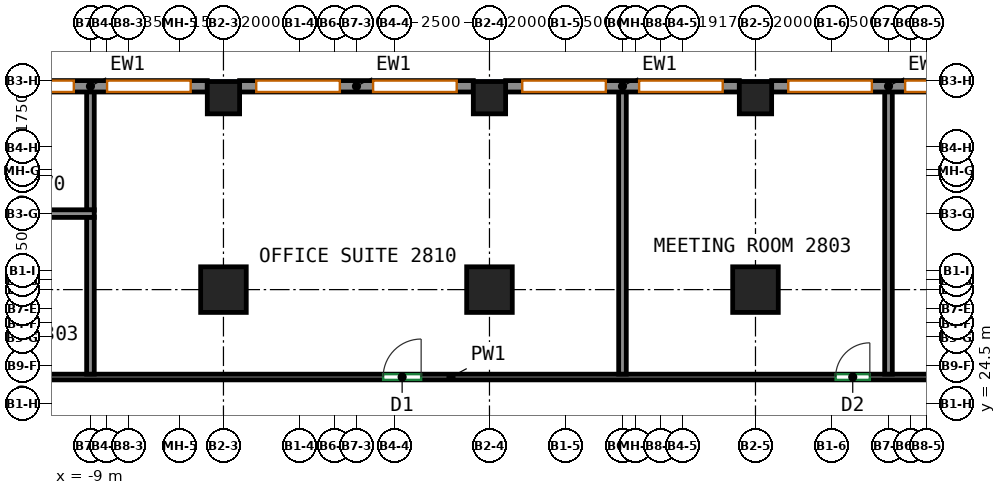
"""IFC4 building model, lengths in metres.
Left out: names, types, materials, properties, quantities, classifications, styles, units other than length and angle.
Written with IfcOpenShell. Run it as: python <this file> out.ifc"""

import sys

from ifc_helpers import new_model, si_unit, direction, frame, frame_2d, origin, origin_2d, place, context, subcontext, project, spatial, rectangle, extrude, source, transform, mapped, element, fill, save


model = new_model("IFC4")
c1 = context("Model", 3, precision=1e-05, world=origin(), true_north=direction((0.0, 1.0)))
c2 = subcontext(c1, "Body", "Model", "MODEL_VIEW")
j1 = project(units=[si_unit("LENGTHUNIT", "METRE"), si_unit("PLANEANGLEUNIT", "RADIAN")], contexts=[c1])
p1 = place(None, origin())
s1 = spatial("IfcSite", under=j1, at=p1, CompositionType="ELEMENT")
p2 = place(p1, origin())
s2 = spatial("IfcBuilding", under=s1, at=p2, CompositionType="ELEMENT")
p3 = place(p2, frame((0.0, 0.0, 120.6)))
s3 = spatial("IfcBuildingStorey", under=s2, at=p3, CompositionType="ELEMENT", Elevation=120.6)
m1 = source(origin(), c2, "Body", "SweptSolid", [
    extrude(rectangle(XDim=1.2, YDim=1.2, at=origin_2d()), origin(), (0.0, 0.0, 1.0), 3.72),
])
p4 = place(p3, frame((-5.5, 27.5, 0.0), z_axis=(0.0, 0.0, 1.0), x_axis=(1.0, 0.0, 0.0)))
e1 = element("IfcColumn", 1, at=p4, inside=s3, PredefinedType="COLUMN", context=c2, shape_type="MappedRepresentation", body=[
    mapped(m1, transform((0.0, 0.0, 0.0))),
])
m2 = source(origin(), c2, "Body", "SweptSolid", [
    extrude(rectangle(XDim=0.85, YDim=0.85, at=origin_2d()), origin(), (0.0, 0.0, 1.0), 3.72),
])
p5 = place(p3, frame((-5.5, 32.55, 0.0), z_axis=(0.0, 0.0, 1.0), x_axis=(1.0, 0.0, 0.0)))
e2 = element("IfcColumn", 2, at=p5, inside=s3, PredefinedType="COLUMN", context=c2, shape_type="MappedRepresentation", body=[
    mapped(m2, transform((0.0, 0.0, 0.0))),
])
p6 = place(p3, frame((1.5, 27.5, 0.0), z_axis=(0.0, 0.0, 1.0), x_axis=(1.0, 0.0, 0.0)))
e3 = element("IfcColumn", 3, at=p6, inside=s3, PredefinedType="COLUMN", context=c2, shape_type="MappedRepresentation", body=[
    mapped(m1, transform((0.0, 0.0, 0.0))),
])
p7 = place(p3, frame((1.5, 32.55, 0.0), z_axis=(0.0, 0.0, 1.0), x_axis=(1.0, 0.0, 0.0)))
e4 = element("IfcColumn", 4, at=p7, inside=s3, PredefinedType="COLUMN", context=c2, shape_type="MappedRepresentation", body=[
    mapped(m2, transform((0.0, 0.0, 0.0))),
])
p8 = place(p3, frame((8.5, 27.5, 0.0), z_axis=(0.0, 0.0, 1.0), x_axis=(1.0, 0.0, 0.0)))
e5 = element("IfcColumn", 5, at=p8, inside=s3, PredefinedType="COLUMN", context=c2, shape_type="MappedRepresentation", body=[
    mapped(m1, transform((0.0, 0.0, 0.0))),
])
p9 = place(p3, frame((8.5, 32.55, 0.0), z_axis=(0.0, 0.0, 1.0), x_axis=(1.0, 0.0, 0.0)))
e6 = element("IfcColumn", 6, at=p9, inside=s3, PredefinedType="COLUMN", context=c2, shape_type="MappedRepresentation", body=[
    mapped(m2, transform((0.0, 0.0, 0.0))),
])
m3 = source(origin(), c2, "Body", "SweptSolid", [
    extrude(rectangle(XDim=6.15, YDim=0.3, at=frame_2d((3.075, 0.0))), origin(), (0.0, 0.0, 1.0), 3.72),
])
p10 = place(p3, frame((15.075, 32.85, 0.0), z_axis=(0.0, 0.0, 1.0), x_axis=(-1.0, 0.0, 0.0)))
e7 = element("IfcWall", 7, at=p10, inside=s3, PredefinedType="SOLIDWALL", context=c2, shape_type="MappedRepresentation", body=[
    mapped(m3, transform((0.0, 0.0, 0.0))),
])
p11 = place(p10, frame((0.438, 0.0, 0.7)))
e8 = element("IfcOpeningElement", 8, at=p11, cuts=e7, PredefinedType="OPENING", context=c2, shape_type="SweptSolid", body=[
    extrude(rectangle(XDim=2.2, YDim=2.25, at=frame_2d((1.1, 1.125))), frame((0.0, 0.16, 0.0), z_axis=(0.0, -1.0, 0.0), x_axis=(1.0, 0.0, 0.0)), (0.0, 0.0, 1.0), 0.32),
])
p12 = place(p10, frame((3.512, 0.0, 0.7)))
e9 = element("IfcOpeningElement", 9, at=p12, cuts=e7, PredefinedType="OPENING", context=c2, shape_type="SweptSolid", body=[
    extrude(rectangle(XDim=2.2, YDim=2.25, at=frame_2d((1.1, 1.125))), frame((0.0, 0.16, 0.0), z_axis=(0.0, -1.0, 0.0), x_axis=(1.0, 0.0, 0.0)), (0.0, 0.0, 1.0), 0.32),
])
p13 = place(p3, frame((8.075, 32.85, 0.0), z_axis=(0.0, 0.0, 1.0), x_axis=(-1.0, 0.0, 0.0)))
e10 = element("IfcWall", 10, at=p13, inside=s3, PredefinedType="SOLIDWALL", context=c2, shape_type="MappedRepresentation", body=[
    mapped(m3, transform((0.0, 0.0, 0.0))),
])
p14 = place(p13, frame((0.438, 0.0, 0.7)))
e11 = element("IfcOpeningElement", 11, at=p14, cuts=e10, PredefinedType="OPENING", context=c2, shape_type="SweptSolid", body=[
    extrude(rectangle(XDim=2.2, YDim=2.25, at=frame_2d((1.1, 1.125))), frame((0.0, 0.16, 0.0), z_axis=(0.0, -1.0, 0.0), x_axis=(1.0, 0.0, 0.0)), (0.0, 0.0, 1.0), 0.32),
])
p15 = place(p13, frame((3.512, 0.0, 0.7)))
e12 = element("IfcOpeningElement", 12, at=p15, cuts=e10, PredefinedType="OPENING", context=c2, shape_type="SweptSolid", body=[
    extrude(rectangle(XDim=2.2, YDim=2.25, at=frame_2d((1.1, 1.125))), frame((0.0, 0.16, 0.0), z_axis=(0.0, -1.0, 0.0), x_axis=(1.0, 0.0, 0.0)), (0.0, 0.0, 1.0), 0.32),
])
p16 = place(p3, frame((1.075, 32.85, 0.0), z_axis=(0.0, 0.0, 1.0), x_axis=(-1.0, 0.0, 0.0)))
e13 = element("IfcWall", 13, at=p16, inside=s3, PredefinedType="SOLIDWALL", context=c2, shape_type="MappedRepresentation", body=[
    mapped(m3, transform((0.0, 0.0, 0.0))),
])
p17 = place(p16, frame((0.438, 0.0, 0.7)))
e14 = element("IfcOpeningElement", 14, at=p17, cuts=e13, PredefinedType="OPENING", context=c2, shape_type="SweptSolid", body=[
    extrude(rectangle(XDim=2.2, YDim=2.25, at=frame_2d((1.1, 1.125))), frame((0.0, 0.16, 0.0), z_axis=(0.0, -1.0, 0.0), x_axis=(1.0, 0.0, 0.0)), (0.0, 0.0, 1.0), 0.32),
])
p18 = place(p16, frame((3.512, 0.0, 0.7)))
e15 = element("IfcOpeningElement", 15, at=p18, cuts=e13, PredefinedType="OPENING", context=c2, shape_type="SweptSolid", body=[
    extrude(rectangle(XDim=2.2, YDim=2.25, at=frame_2d((1.1, 1.125))), frame((0.0, 0.16, 0.0), z_axis=(0.0, -1.0, 0.0), x_axis=(1.0, 0.0, 0.0)), (0.0, 0.0, 1.0), 0.32),
])
p19 = place(p3, frame((-5.925, 32.85, 0.0), z_axis=(0.0, 0.0, 1.0), x_axis=(-1.0, 0.0, 0.0)))
e16 = element("IfcWall", 16, at=p19, inside=s3, PredefinedType="SOLIDWALL", context=c2, shape_type="MappedRepresentation", body=[
    mapped(m3, transform((0.0, 0.0, 0.0))),
])
p20 = place(p19, frame((0.438, 0.0, 0.7)))
e17 = element("IfcOpeningElement", 17, at=p20, cuts=e16, PredefinedType="OPENING", context=c2, shape_type="SweptSolid", body=[
    extrude(rectangle(XDim=2.2, YDim=2.25, at=frame_2d((1.1, 1.125))), frame((0.0, 0.16, 0.0), z_axis=(0.0, -1.0, 0.0), x_axis=(1.0, 0.0, 0.0)), (0.0, 0.0, 1.0), 0.32),
])
p21 = place(p19, frame((3.512, 0.0, 0.7)))
e18 = element("IfcOpeningElement", 18, at=p21, cuts=e16, PredefinedType="OPENING", context=c2, shape_type="SweptSolid", body=[
    extrude(rectangle(XDim=2.2, YDim=2.25, at=frame_2d((1.1, 1.125))), frame((0.0, 0.16, 0.0), z_axis=(0.0, -1.0, 0.0), x_axis=(1.0, 0.0, 0.0)), (0.0, 0.0, 1.0), 0.32),
])
p22 = place(p3, frame((-19.6, 25.2, 0.0), z_axis=(0.0, 0.0, 1.0), x_axis=(1.0, 0.0, 0.0)))
e19 = element("IfcWall", 19, at=p22, inside=s3, PredefinedType="PARTITIONING", context=c2, shape_type="SweptSolid", body=[
    extrude(rectangle(XDim=40.175, YDim=0.15, at=frame_2d((20.087, 0.0))), origin(), (0.0, 0.0, 1.0), 3.72),
])
p23 = place(p22, frame((1.104, 0.0, 0.0)))
e20 = element("IfcOpeningElement", 20, at=p23, cuts=e19, PredefinedType="OPENING", context=c2, shape_type="SweptSolid", body=[
    extrude(rectangle(XDim=0.9, YDim=2.1, at=frame_2d((0.45, 1.05))), frame((0.0, 0.085, 0.0), z_axis=(0.0, -1.0, 0.0), x_axis=(1.0, 0.0, 0.0)), (0.0, 0.0, 1.0), 0.17),
])
p24 = place(p22, frame((5.296, 0.0, 0.0)))
e21 = element("IfcOpeningElement", 21, at=p24, cuts=e19, PredefinedType="OPENING", context=c2, shape_type="SweptSolid", body=[
    extrude(rectangle(XDim=0.9, YDim=2.1, at=frame_2d((0.45, 1.05))), frame((0.0, 0.085, 0.0), z_axis=(0.0, -1.0, 0.0), x_axis=(1.0, 0.0, 0.0)), (0.0, 0.0, 1.0), 0.17),
])
p25 = place(p22, frame((18.302, 0.0, 0.0)))
e22 = element("IfcOpeningElement", 22, at=p25, cuts=e19, PredefinedType="OPENING", context=c2, shape_type="SweptSolid", body=[
    extrude(rectangle(XDim=1.0, YDim=2.1, at=frame_2d((0.5, 1.05))), frame((0.0, 0.085, 0.0), z_axis=(0.0, -1.0, 0.0), x_axis=(1.0, 0.0, 0.0)), (0.0, 0.0, 1.0), 0.17),
])
p26 = place(p22, frame((30.209, 0.0, 0.0)))
e23 = element("IfcOpeningElement", 23, at=p26, cuts=e19, PredefinedType="OPENING", context=c2, shape_type="SweptSolid", body=[
    extrude(rectangle(XDim=0.9, YDim=2.1, at=frame_2d((0.45, 1.05))), frame((0.0, 0.085, 0.0), z_axis=(0.0, -1.0, 0.0), x_axis=(1.0, 0.0, 0.0)), (0.0, 0.0, 1.0), 0.17),
])
p27 = place(p22, frame((32.702, 0.0, 0.0)))
e24 = element("IfcOpeningElement", 24, at=p27, cuts=e19, PredefinedType="OPENING", context=c2, shape_type="SweptSolid", body=[
    extrude(rectangle(XDim=1.8, YDim=2.1, at=frame_2d((0.9, 1.05))), frame((0.0, 0.085, 0.0), z_axis=(0.0, -1.0, 0.0), x_axis=(1.0, 0.0, 0.0)), (0.0, 0.0, 1.0), 0.17),
])
for number, where, z_axis, x_axis in (
    (25, (12.0, 25.276, 0.0), (0.0, 0.0, 1.0), (0.0, 1.0, 0.0)),
    (26, (5.0, 25.276, 0.0), (0.0, 0.0, 1.0), (0.0, 1.0, 0.0)),
):
    element("IfcWall", number, at=place(p3, frame(where, z_axis=z_axis, x_axis=x_axis)), inside=s3, PredefinedType="PARTITIONING", context=c2, shape_type="SweptSolid", body=[
        extrude(rectangle(XDim=7.474, YDim=0.2, at=frame_2d((3.737, 0.0))), origin(), (0.0, 0.0, 1.0), 3.72),
    ])
p28 = place(p3, frame((-9.0, 25.276, 0.0), z_axis=(0.0, 0.0, 1.0), x_axis=(0.0, 1.0, 0.0)))
e27 = element("IfcWall", 27, at=p28, inside=s3, PredefinedType="PARTITIONING", context=c2, shape_type="SweptSolid", body=[
    extrude(rectangle(XDim=4.134, YDim=0.2, at=frame_2d((2.067, 0.0))), origin(), (0.0, 0.0, 1.0), 3.72),
])
p29 = place(p3, frame((-9.0, 29.59, 0.0), z_axis=(0.0, 0.0, 1.0), x_axis=(0.0, 1.0, 0.0)))
e28 = element("IfcWall", 28, at=p29, inside=s3, PredefinedType="PARTITIONING", context=c2, shape_type="SweptSolid", body=[
    extrude(rectangle(XDim=3.16, YDim=0.2, at=frame_2d((1.58, 0.0))), origin(), (0.0, 0.0, 1.0), 3.72),
])
p30 = place(p3, frame((-19.6, 29.5, 0.0), z_axis=(0.0, 0.0, 1.0), x_axis=(1.0, 0.0, 0.0)))
e29 = element("IfcWall", 29, at=p30, inside=s3, PredefinedType="PARTITIONING", context=c2, shape_type="SweptSolid", body=[
    extrude(rectangle(XDim=10.7, YDim=0.2, at=frame_2d((5.35, 0.0))), origin(), (0.0, 0.0, 1.0), 3.07),
])
p31 = place(p11, origin())
e30 = element("IfcWindow", 30, at=p31, inside=s3, PartitioningType="SINGLE_PANEL", PredefinedType="WINDOW", context=c2, shape_type="SweptSolid", body=[
    extrude(rectangle(XDim=2.2, YDim=2.25, at=frame_2d((1.1, 1.125))), frame((0.0, 0.03, 0.0), z_axis=(0.0, -1.0, 0.0), x_axis=(1.0, 0.0, 0.0)), (0.0, 0.0, 1.0), 0.06),
])
fill(e8, e30)
p32 = place(p12, origin())
e31 = element("IfcWindow", 31, at=p32, inside=s3, PartitioningType="SINGLE_PANEL", PredefinedType="WINDOW", context=c2, shape_type="SweptSolid", body=[
    extrude(rectangle(XDim=2.2, YDim=2.25, at=frame_2d((1.1, 1.125))), frame((0.0, 0.03, 0.0), z_axis=(0.0, -1.0, 0.0), x_axis=(1.0, 0.0, 0.0)), (0.0, 0.0, 1.0), 0.06),
])
fill(e9, e31)
p33 = place(p14, origin())
e32 = element("IfcWindow", 32, at=p33, inside=s3, PartitioningType="SINGLE_PANEL", PredefinedType="WINDOW", context=c2, shape_type="SweptSolid", body=[
    extrude(rectangle(XDim=2.2, YDim=2.25, at=frame_2d((1.1, 1.125))), frame((0.0, 0.03, 0.0), z_axis=(0.0, -1.0, 0.0), x_axis=(1.0, 0.0, 0.0)), (0.0, 0.0, 1.0), 0.06),
])
fill(e11, e32)
p34 = place(p15, origin())
e33 = element("IfcWindow", 33, at=p34, inside=s3, PartitioningType="SINGLE_PANEL", PredefinedType="WINDOW", context=c2, shape_type="SweptSolid", body=[
    extrude(rectangle(XDim=2.2, YDim=2.25, at=frame_2d((1.1, 1.125))), frame((0.0, 0.03, 0.0), z_axis=(0.0, -1.0, 0.0), x_axis=(1.0, 0.0, 0.0)), (0.0, 0.0, 1.0), 0.06),
])
fill(e12, e33)
p35 = place(p17, origin())
e34 = element("IfcWindow", 34, at=p35, inside=s3, PartitioningType="SINGLE_PANEL", PredefinedType="WINDOW", context=c2, shape_type="SweptSolid", body=[
    extrude(rectangle(XDim=2.2, YDim=2.25, at=frame_2d((1.1, 1.125))), frame((0.0, 0.03, 0.0), z_axis=(0.0, -1.0, 0.0), x_axis=(1.0, 0.0, 0.0)), (0.0, 0.0, 1.0), 0.06),
])
fill(e14, e34)
p36 = place(p18, origin())
e35 = element("IfcWindow", 35, at=p36, inside=s3, PartitioningType="SINGLE_PANEL", PredefinedType="WINDOW", context=c2, shape_type="SweptSolid", body=[
    extrude(rectangle(XDim=2.2, YDim=2.25, at=frame_2d((1.1, 1.125))), frame((0.0, 0.03, 0.0), z_axis=(0.0, -1.0, 0.0), x_axis=(1.0, 0.0, 0.0)), (0.0, 0.0, 1.0), 0.06),
])
fill(e15, e35)
p37 = place(p20, origin())
e36 = element("IfcWindow", 36, at=p37, inside=s3, PartitioningType="SINGLE_PANEL", PredefinedType="WINDOW", context=c2, shape_type="SweptSolid", body=[
    extrude(rectangle(XDim=2.2, YDim=2.25, at=frame_2d((1.1, 1.125))), frame((0.0, 0.03, 0.0), z_axis=(0.0, -1.0, 0.0), x_axis=(1.0, 0.0, 0.0)), (0.0, 0.0, 1.0), 0.06),
])
fill(e17, e36)
p38 = place(p21, origin())
e37 = element("IfcWindow", 37, at=p38, inside=s3, PartitioningType="SINGLE_PANEL", PredefinedType="WINDOW", context=c2, shape_type="SweptSolid", body=[
    extrude(rectangle(XDim=2.2, YDim=2.25, at=frame_2d((1.1, 1.125))), frame((0.0, 0.03, 0.0), z_axis=(0.0, -1.0, 0.0), x_axis=(1.0, 0.0, 0.0)), (0.0, 0.0, 1.0), 0.06),
])
fill(e18, e37)
p39 = place(p25, origin())
e38 = element("IfcDoor", 38, at=p39, inside=s3, OperationType="SINGLE_SWING_RIGHT", PredefinedType="DOOR", context=c2, shape_type="SweptSolid", body=[
    extrude(rectangle(XDim=1.0, YDim=2.1, at=frame_2d((0.5, 1.05))), frame((0.0, 0.025, 0.0), z_axis=(0.0, -1.0, 0.0), x_axis=(1.0, 0.0, 0.0)), (0.0, 0.0, 1.0), 0.05),
])
fill(e22, e38)
p40 = place(p26, origin())
e39 = element("IfcDoor", 39, at=p40, inside=s3, OperationType="SINGLE_SWING_RIGHT", PredefinedType="DOOR", context=c2, shape_type="SweptSolid", body=[
    extrude(rectangle(XDim=0.9, YDim=2.1, at=frame_2d((0.45, 1.05))), frame((0.0, 0.025, 0.0), z_axis=(0.0, -1.0, 0.0), x_axis=(1.0, 0.0, 0.0)), (0.0, 0.0, 1.0), 0.05),
])
fill(e23, e39)
save(model, sys.argv[1])
